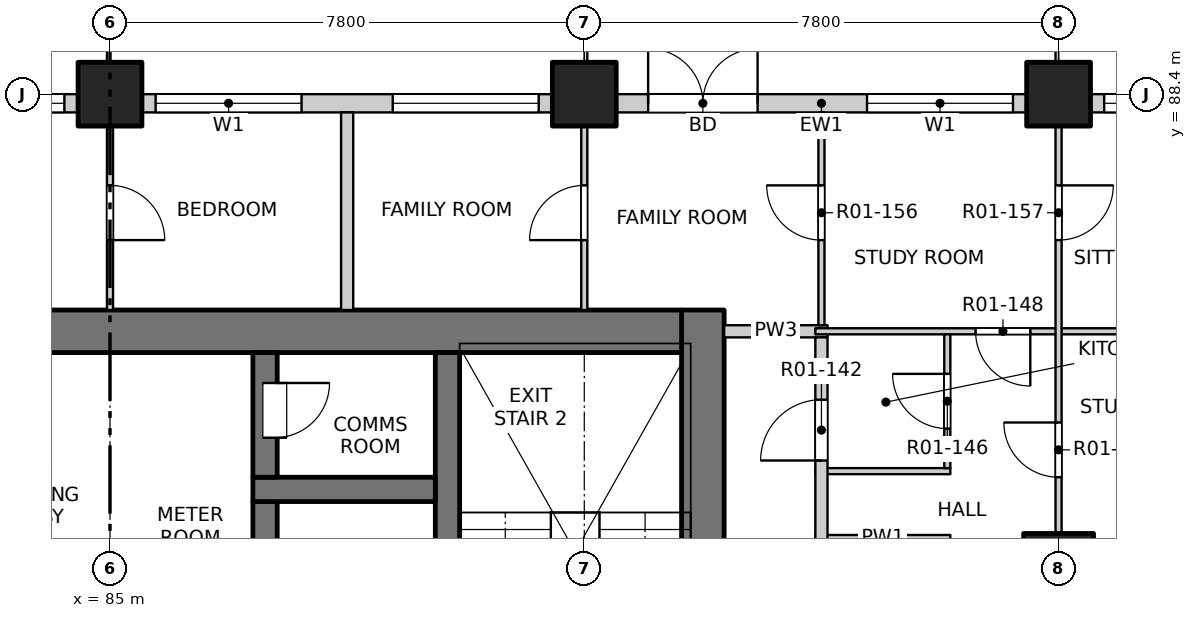
"""IFC4 building model, lengths in metres.
Left out: names, types, materials, properties, quantities, classifications, styles, units other than length and angle.
Written with IfcOpenShell. Run it as: python <this file> out.ifc"""

import sys

from ifc_helpers import new_model, si_unit, direction, frame, frame_2d, origin, origin_2d, place, context, subcontext, project, spatial, rectangle, extrude, element, fill, save


model = new_model("IFC4")
c1 = context("Model", 3, precision=1e-05, world=origin(), true_north=direction((0.0, 1.0)))
c2 = subcontext(c1, "Body", "Model", "MODEL_VIEW")
j1 = project(units=[si_unit("LENGTHUNIT", "METRE"), si_unit("PLANEANGLEUNIT", "RADIAN")], contexts=[c1])
p1 = place(None, origin())
s1 = spatial("IfcSite", under=j1, at=p1, CompositionType="ELEMENT")
p2 = place(p1, origin())
s2 = spatial("IfcBuilding", under=s1, at=p2, CompositionType="ELEMENT")
p3 = place(p2, frame((0.0, 0.0, 26.3)))
s3 = spatial("IfcBuildingStorey", under=s2, at=p3, CompositionType="ELEMENT", Elevation=26.3)
for number, where, z_axis, x_axis in (
    (1, (85.0, 88.4, -0.25), (0.0, 0.0, 1.0), (1.0, 0.0, 0.0)),
    (2, (92.8, 88.4, -0.25), (0.0, 0.0, 1.0), (1.0, 0.0, 0.0)),
    (3, (100.6, 88.4, -0.25), (0.0, 0.0, 1.0), (1.0, 0.0, 0.0)),
):
    element("IfcColumn", number, at=place(p3, frame(where, z_axis=z_axis, x_axis=x_axis)), inside=s3, PredefinedType="COLUMN", context=c2, shape_type="SweptSolid", body=[
        extrude(rectangle(XDim=1.05, YDim=1.05, at=origin_2d()), origin(), (0.0, 0.0, 1.0), 3.4),
    ])
p4 = place(p3, frame((100.6, 80.6, -0.25), z_axis=(0.0, 0.0, 1.0), x_axis=(1.0, 0.0, 0.0)))
e4 = element("IfcColumn", 4, at=p4, inside=s3, PredefinedType="COLUMN", context=c2, shape_type="SweptSolid", body=[
    extrude(rectangle(XDim=1.15, YDim=1.15, at=origin_2d()), origin(), (0.0, 0.0, 1.0), 3.4),
])
p5 = place(p3, frame((94.75, 77.3, -0.25), z_axis=(0.0, 0.0, 1.0), x_axis=(0.0, 1.0, 0.0)))
e5 = element("IfcWall", 5, at=p5, inside=s3, PredefinedType="SOLIDWALL", context=c2, shape_type="SweptSolid", body=[
    extrude(rectangle(XDim=7.55, YDim=0.7, at=frame_2d((3.775, 0.0))), origin(), (0.0, 0.0, 1.0), 3.4),
])
p6 = place(p5, frame((0.3, 0.0, 0.25)))
e6 = element("IfcOpeningElement", 6, at=p6, cuts=e5, PredefinedType="OPENING", context=c2, shape_type="SweptSolid", body=[
    extrude(rectangle(XDim=1.2, YDim=2.1, at=frame_2d((0.6, 1.05))), frame((0.0, 0.36, 0.0), z_axis=(0.0, -1.0, 0.0), x_axis=(1.0, 0.0, 0.0)), (0.0, 0.0, 1.0), 0.72),
])
p7 = place(p3, frame((75.6, 84.5, -0.25), z_axis=(0.0, 0.0, 1.0), x_axis=(1.0, 0.0, 0.0)))
e7 = element("IfcWall", 7, at=p7, inside=s3, PredefinedType="SOLIDWALL", context=c2, shape_type="SweptSolid", body=[
    extrude(rectangle(XDim=18.8, YDim=0.7, at=frame_2d((9.4, 0.0))), origin(), (0.0, 0.0, 1.0), 3.4),
])
p8 = place(p3, frame((90.55, 77.3, -0.25), z_axis=(0.0, 0.0, 1.0), x_axis=(0.0, 1.0, 0.0)))
e8 = element("IfcWall", 8, at=p8, inside=s3, PredefinedType="SOLIDWALL", context=c2, shape_type="SweptSolid", body=[
    extrude(rectangle(XDim=6.85, YDim=0.4, at=frame_2d((3.425, 0.0))), origin(), (0.0, 0.0, 1.0), 3.4),
])
p9 = place(p3, frame((87.55, 79.5, -0.25), z_axis=(0.0, 0.0, 1.0), x_axis=(0.0, 1.0, 0.0)))
e9 = element("IfcWall", 9, at=p9, inside=s3, PredefinedType="SOLIDWALL", context=c2, shape_type="SweptSolid", body=[
    extrude(rectangle(XDim=2.2, YDim=0.4, at=frame_2d((1.1, 0.0))), origin(), (0.0, 0.0, 1.0), 3.4),
])
p10 = place(p9, frame((0.65, 0.0, 0.25)))
e10 = element("IfcOpeningElement", 10, at=p10, cuts=e9, PredefinedType="OPENING", context=c2, shape_type="SweptSolid", body=[
    extrude(rectangle(XDim=0.9, YDim=2.1, at=frame_2d((0.45, 1.05))), frame((0.0, 0.21, 0.0), z_axis=(0.0, -1.0, 0.0), x_axis=(1.0, 0.0, 0.0)), (0.0, 0.0, 1.0), 0.42),
])
p11 = place(p3, frame((87.35, 81.9, -0.25), z_axis=(0.0, 0.0, 1.0), x_axis=(1.0, 0.0, 0.0)))
e11 = element("IfcWall", 11, at=p11, inside=s3, PredefinedType="SOLIDWALL", context=c2, shape_type="SweptSolid", body=[
    extrude(rectangle(XDim=3.0, YDim=0.4, at=frame_2d((1.5, 0.0))), origin(), (0.0, 0.0, 1.0), 3.4),
])
p12 = place(p3, frame((87.55, 82.1, -0.25), z_axis=(0.0, 0.0, 1.0), x_axis=(0.0, 1.0, 0.0)))
e12 = element("IfcWall", 12, at=p12, inside=s3, PredefinedType="SOLIDWALL", context=c2, shape_type="SweptSolid", body=[
    extrude(rectangle(XDim=2.05, YDim=0.4, at=frame_2d((1.025, 0.0))), origin(), (0.0, 0.0, 1.0), 3.4),
])
p13 = place(p12, frame((0.65, 0.0, 0.25)))
e13 = element("IfcOpeningElement", 13, at=p13, cuts=e12, PredefinedType="OPENING", context=c2, shape_type="SweptSolid", body=[
    extrude(rectangle(XDim=0.9, YDim=2.1, at=frame_2d((0.45, 1.05))), frame((0.0, 0.21, 0.0), z_axis=(0.0, -1.0, 0.0), x_axis=(1.0, 0.0, 0.0)), (0.0, 0.0, 1.0), 0.42),
])
p14 = place(p3, frame((77.725, 88.25, 0.0), z_axis=(0.0, 0.0, 1.0), x_axis=(1.0, 0.0, 0.0)))
e14 = element("IfcWall", 14, at=p14, inside=s3, PredefinedType="SOLIDWALL", context=c2, shape_type="SweptSolid", body=[
    extrude(rectangle(XDim=6.75, YDim=0.3, at=frame_2d((3.375, 0.0))), origin(), (0.0, 0.0, 1.0), 2.7),
])
p15 = place(p14, frame((0.525, 0.0, 0.0)))
e15 = element("IfcOpeningElement", 15, at=p15, cuts=e14, PredefinedType="OPENING", context=c2, shape_type="SweptSolid", body=[
    extrude(rectangle(XDim=1.8, YDim=2.4, at=frame_2d((0.9, 1.2))), frame((0.0, 0.16, 0.0), z_axis=(0.0, -1.0, 0.0), x_axis=(1.0, 0.0, 0.0)), (0.0, 0.0, 1.0), 0.32),
])
p16 = place(p14, frame((4.125, 0.0, 0.9)))
e16 = element("IfcOpeningElement", 16, at=p16, cuts=e14, PredefinedType="OPENING", context=c2, shape_type="SweptSolid", body=[
    extrude(rectangle(XDim=2.4, YDim=1.8, at=frame_2d((1.2, 0.9))), frame((0.0, 0.16, 0.0), z_axis=(0.0, -1.0, 0.0), x_axis=(1.0, 0.0, 0.0)), (0.0, 0.0, 1.0), 0.32),
])
p17 = place(p3, frame((85.525, 88.25, 0.0), z_axis=(0.0, 0.0, 1.0), x_axis=(1.0, 0.0, 0.0)))
e17 = element("IfcWall", 17, at=p17, inside=s3, PredefinedType="SOLIDWALL", context=c2, shape_type="SweptSolid", body=[
    extrude(rectangle(XDim=6.75, YDim=0.3, at=frame_2d((3.375, 0.0))), origin(), (0.0, 0.0, 1.0), 2.7),
])
p18 = place(p17, frame((0.225, 0.0, 0.9)))
e18 = element("IfcOpeningElement", 18, at=p18, cuts=e17, PredefinedType="OPENING", context=c2, shape_type="SweptSolid", body=[
    extrude(rectangle(XDim=2.4, YDim=1.8, at=frame_2d((1.2, 0.9))), frame((0.0, 0.16, 0.0), z_axis=(0.0, -1.0, 0.0), x_axis=(1.0, 0.0, 0.0)), (0.0, 0.0, 1.0), 0.32),
])
p19 = place(p17, frame((4.125, 0.0, 0.9)))
e19 = element("IfcOpeningElement", 19, at=p19, cuts=e17, PredefinedType="OPENING", context=c2, shape_type="SweptSolid", body=[
    extrude(rectangle(XDim=2.4, YDim=1.8, at=frame_2d((1.2, 0.9))), frame((0.0, 0.16, 0.0), z_axis=(0.0, -1.0, 0.0), x_axis=(1.0, 0.0, 0.0)), (0.0, 0.0, 1.0), 0.32),
])
p20 = place(p3, frame((93.325, 88.25, 0.0), z_axis=(0.0, 0.0, 1.0), x_axis=(1.0, 0.0, 0.0)))
e20 = element("IfcWall", 20, at=p20, inside=s3, PredefinedType="SOLIDWALL", context=c2, shape_type="SweptSolid", body=[
    extrude(rectangle(XDim=6.75, YDim=0.3, at=frame_2d((3.375, 0.0))), origin(), (0.0, 0.0, 1.0), 2.7),
])
p21 = place(p20, frame((0.525, 0.0, 0.0)))
e21 = element("IfcOpeningElement", 21, at=p21, cuts=e20, PredefinedType="OPENING", context=c2, shape_type="SweptSolid", body=[
    extrude(rectangle(XDim=1.8, YDim=2.4, at=frame_2d((0.9, 1.2))), frame((0.0, 0.16, 0.0), z_axis=(0.0, -1.0, 0.0), x_axis=(1.0, 0.0, 0.0)), (0.0, 0.0, 1.0), 0.32),
])
p22 = place(p20, frame((4.125, 0.0, 0.9)))
e22 = element("IfcOpeningElement", 22, at=p22, cuts=e20, PredefinedType="OPENING", context=c2, shape_type="SweptSolid", body=[
    extrude(rectangle(XDim=2.4, YDim=1.8, at=frame_2d((1.2, 0.9))), frame((0.0, 0.16, 0.0), z_axis=(0.0, -1.0, 0.0), x_axis=(1.0, 0.0, 0.0)), (0.0, 0.0, 1.0), 0.32),
])
p23 = place(p3, frame((101.125, 88.25, 0.0), z_axis=(0.0, 0.0, 1.0), x_axis=(1.0, 0.0, 0.0)))
e23 = element("IfcWall", 23, at=p23, inside=s3, PredefinedType="SOLIDWALL", context=c2, shape_type="SweptSolid", body=[
    extrude(rectangle(XDim=3.375, YDim=0.3, at=frame_2d((1.688, 0.0))), origin(), (0.0, 0.0, 1.0), 2.7),
])
p24 = place(p23, frame((0.225, 0.0, 0.9)))
e24 = element("IfcOpeningElement", 24, at=p24, cuts=e23, PredefinedType="OPENING", context=c2, shape_type="SweptSolid", body=[
    extrude(rectangle(XDim=2.4, YDim=1.8, at=frame_2d((1.2, 0.9))), frame((0.0, 0.16, 0.0), z_axis=(0.0, -1.0, 0.0), x_axis=(1.0, 0.0, 0.0)), (0.0, 0.0, 1.0), 0.32),
])
for number, where, z_axis, x_axis in (
    (25, (96.6, 81.1, 0.0), (0.0, 0.0, 1.0), (1.0, 0.0, 0.0)),
    (26, (96.6, 82.2, 0.0), (0.0, 0.0, 1.0), (1.0, 0.0, 0.0)),
):
    element("IfcWall", number, at=place(p3, frame(where, z_axis=z_axis, x_axis=x_axis)), inside=s3, PredefinedType="PARTITIONING", context=c2, shape_type="SweptSolid", body=[
        extrude(rectangle(XDim=2.22, YDim=0.1, at=frame_2d((1.11, 0.0))), origin(), (0.0, 0.0, 1.0), 3.15),
    ])
p25 = place(p3, frame((95.1, 84.5, 0.0), z_axis=(0.0, 0.0, 1.0), x_axis=(1.0, 0.0, 0.0)))
e27 = element("IfcWall", 27, at=p25, inside=s3, PredefinedType="PARTITIONING", context=c2, shape_type="SweptSolid", body=[
    extrude(rectangle(XDim=1.7, YDim=0.2, at=frame_2d((0.85, 0.0))), origin(), (0.0, 0.0, 1.0), 3.15),
])
p26 = place(p3, frame((96.6, 84.5, 0.0), z_axis=(0.0, 0.0, 1.0), x_axis=(1.0, 0.0, 0.0)))
e28 = element("IfcWall", 28, at=p26, inside=s3, PredefinedType="PARTITIONING", context=c2, shape_type="SweptSolid", body=[
    extrude(rectangle(XDim=11.5, YDim=0.1, at=frame_2d((5.75, 0.0))), origin(), (0.0, 0.0, 1.0), 3.15),
])
p27 = place(p26, frame((2.635, 0.0, 0.0)))
e29 = element("IfcOpeningElement", 29, at=p27, cuts=e28, PredefinedType="OPENING", context=c2, shape_type="SweptSolid", body=[
    extrude(rectangle(XDim=0.9, YDim=2.1, at=frame_2d((0.45, 1.05))), frame((0.0, 0.06, 0.0), z_axis=(0.0, -1.0, 0.0), x_axis=(1.0, 0.0, 0.0)), (0.0, 0.0, 1.0), 0.12),
])
p28 = place(p3, frame((85.0, 84.85, 0.0), z_axis=(0.0, 0.0, 1.0), x_axis=(0.0, 1.0, 0.0)))
e30 = element("IfcWall", 30, at=p28, inside=s3, PredefinedType="PARTITIONING", context=c2, shape_type="SweptSolid", body=[
    extrude(rectangle(XDim=3.25, YDim=0.1, at=frame_2d((1.625, 0.0))), origin(), (0.0, 0.0, 1.0), 3.15),
])
p29 = place(p28, frame((1.15, 0.0, 0.0)))
e31 = element("IfcOpeningElement", 31, at=p29, cuts=e30, PredefinedType="OPENING", context=c2, shape_type="SweptSolid", body=[
    extrude(rectangle(XDim=0.9, YDim=2.1, at=frame_2d((0.45, 1.05))), frame((0.0, 0.06, 0.0), z_axis=(0.0, -1.0, 0.0), x_axis=(1.0, 0.0, 0.0)), (0.0, 0.0, 1.0), 0.12),
])
p30 = place(p3, frame((88.9, 84.85, 0.0), z_axis=(0.0, 0.0, 1.0), x_axis=(0.0, 1.0, 0.0)))
e32 = element("IfcWall", 32, at=p30, inside=s3, PredefinedType="PARTITIONING", context=c2, shape_type="SweptSolid", body=[
    extrude(rectangle(XDim=3.25, YDim=0.2, at=frame_2d((1.625, 0.0))), origin(), (0.0, 0.0, 1.0), 3.15),
])
p31 = place(p3, frame((92.8, 84.85, 0.0), z_axis=(0.0, 0.0, 1.0), x_axis=(0.0, 1.0, 0.0)))
e33 = element("IfcWall", 33, at=p31, inside=s3, PredefinedType="PARTITIONING", context=c2, shape_type="SweptSolid", body=[
    extrude(rectangle(XDim=3.25, YDim=0.1, at=frame_2d((1.625, 0.0))), origin(), (0.0, 0.0, 1.0), 3.15),
])
p32 = place(p31, frame((1.15, 0.0, 0.0)))
e34 = element("IfcOpeningElement", 34, at=p32, cuts=e33, PredefinedType="OPENING", context=c2, shape_type="SweptSolid", body=[
    extrude(rectangle(XDim=0.9, YDim=2.1, at=frame_2d((0.45, 1.05))), frame((0.0, 0.06, 0.0), z_axis=(0.0, -1.0, 0.0), x_axis=(1.0, 0.0, 0.0)), (0.0, 0.0, 1.0), 0.12),
])
p33 = place(p3, frame((96.7, 53.4, 0.0), z_axis=(0.0, 0.0, 1.0), x_axis=(0.0, 1.0, 0.0)))
e35 = element("IfcWall", 35, at=p33, inside=s3, PredefinedType="PARTITIONING", context=c2, shape_type="SweptSolid", body=[
    extrude(rectangle(XDim=31.0, YDim=0.2, at=frame_2d((15.5, 0.0))), origin(), (0.0, 0.0, 1.0), 3.15),
])
p34 = place(p33, frame((5.575, 0.0, 0.0)))
e36 = element("IfcOpeningElement", 36, at=p34, cuts=e35, PredefinedType="OPENING", context=c2, shape_type="SweptSolid", body=[
    extrude(rectangle(XDim=1.0, YDim=2.1, at=frame_2d((0.5, 1.05))), frame((0.0, 0.11, 0.0), z_axis=(0.0, -1.0, 0.0), x_axis=(1.0, 0.0, 0.0)), (0.0, 0.0, 1.0), 0.22),
])
p35 = place(p33, frame((10.075, 0.0, 0.0)))
e37 = element("IfcOpeningElement", 37, at=p35, cuts=e35, PredefinedType="OPENING", context=c2, shape_type="SweptSolid", body=[
    extrude(rectangle(XDim=1.0, YDim=2.1, at=frame_2d((0.5, 1.05))), frame((0.0, 0.11, 0.0), z_axis=(0.0, -1.0, 0.0), x_axis=(1.0, 0.0, 0.0)), (0.0, 0.0, 1.0), 0.22),
])
p36 = place(p33, frame((28.975, 0.0, 0.0)))
e38 = element("IfcOpeningElement", 38, at=p36, cuts=e35, PredefinedType="OPENING", context=c2, shape_type="SweptSolid", body=[
    extrude(rectangle(XDim=1.0, YDim=2.1, at=frame_2d((0.5, 1.05))), frame((0.0, 0.11, 0.0), z_axis=(0.0, -1.0, 0.0), x_axis=(1.0, 0.0, 0.0)), (0.0, 0.0, 1.0), 0.22),
])
p37 = place(p3, frame((96.7, 84.6, 0.0), z_axis=(0.0, 0.0, 1.0), x_axis=(0.0, 1.0, 0.0)))
e39 = element("IfcWall", 39, at=p37, inside=s3, PredefinedType="PARTITIONING", context=c2, shape_type="SweptSolid", body=[
    extrude(rectangle(XDim=3.5, YDim=0.1, at=frame_2d((1.75, 0.0))), origin(), (0.0, 0.0, 1.0), 3.15),
])
p38 = place(p37, frame((1.4, 0.0, 0.0)))
e40 = element("IfcOpeningElement", 40, at=p38, cuts=e39, PredefinedType="OPENING", context=c2, shape_type="SweptSolid", body=[
    extrude(rectangle(XDim=0.9, YDim=2.1, at=frame_2d((0.45, 1.05))), frame((0.0, 0.06, 0.0), z_axis=(0.0, -1.0, 0.0), x_axis=(1.0, 0.0, 0.0)), (0.0, 0.0, 1.0), 0.12),
])
p39 = place(p3, frame((98.77, 82.25, 0.0), z_axis=(0.0, 0.0, 1.0), x_axis=(0.0, 1.0, 0.0)))
e41 = element("IfcWall", 41, at=p39, inside=s3, PredefinedType="PARTITIONING", context=c2, shape_type="SweptSolid", body=[
    extrude(rectangle(XDim=2.2, YDim=0.1, at=frame_2d((1.1, 0.0))), origin(), (0.0, 0.0, 1.0), 3.15),
])
p40 = place(p39, frame((0.65, 0.0, 0.0)))
e42 = element("IfcOpeningElement", 42, at=p40, cuts=e41, PredefinedType="OPENING", context=c2, shape_type="SweptSolid", body=[
    extrude(rectangle(XDim=0.9, YDim=2.1, at=frame_2d((0.45, 1.05))), frame((0.0, 0.06, 0.0), z_axis=(0.0, -1.0, 0.0), x_axis=(1.0, 0.0, 0.0)), (0.0, 0.0, 1.0), 0.12),
])
p41 = place(p3, frame((100.6, 80.6, 0.0), z_axis=(0.0, 0.0, 1.0), x_axis=(0.0, 1.0, 0.0)))
e43 = element("IfcWall", 43, at=p41, inside=s3, PredefinedType="PARTITIONING", context=c2, shape_type="SweptSolid", body=[
    extrude(rectangle(XDim=7.5, YDim=0.1, at=frame_2d((3.75, 0.0))), origin(), (0.0, 0.0, 1.0), 2.55),
])
p42 = place(p41, frame((1.5, 0.0, 0.0)))
e44 = element("IfcOpeningElement", 44, at=p42, cuts=e43, PredefinedType="OPENING", context=c2, shape_type="SweptSolid", body=[
    extrude(rectangle(XDim=0.9, YDim=2.1, at=frame_2d((0.45, 1.05))), frame((0.0, 0.06, 0.0), z_axis=(0.0, -1.0, 0.0), x_axis=(1.0, 0.0, 0.0)), (0.0, 0.0, 1.0), 0.12),
])
p43 = place(p41, frame((5.4, 0.0, 0.0)))
e45 = element("IfcOpeningElement", 45, at=p43, cuts=e43, PredefinedType="OPENING", context=c2, shape_type="SweptSolid", body=[
    extrude(rectangle(XDim=0.9, YDim=2.1, at=frame_2d((0.45, 1.05))), frame((0.0, 0.06, 0.0), z_axis=(0.0, -1.0, 0.0), x_axis=(1.0, 0.0, 0.0)), (0.0, 0.0, 1.0), 0.12),
])
p44 = place(p16, origin())
e46 = element("IfcWindow", 46, at=p44, inside=s3, PartitioningType="DOUBLE_PANEL_VERTICAL", PredefinedType="WINDOW", context=c2, shape_type="SweptSolid", body=[
    extrude(rectangle(XDim=2.4, YDim=1.8, at=frame_2d((1.2, 0.9))), frame((0.0, 0.03, 0.0), z_axis=(0.0, -1.0, 0.0), x_axis=(1.0, 0.0, 0.0)), (0.0, 0.0, 1.0), 0.06),
])
fill(e16, e46)
p45 = place(p18, origin())
e47 = element("IfcWindow", 47, at=p45, inside=s3, PartitioningType="DOUBLE_PANEL_VERTICAL", PredefinedType="WINDOW", context=c2, shape_type="SweptSolid", body=[
    extrude(rectangle(XDim=2.4, YDim=1.8, at=frame_2d((1.2, 0.9))), frame((0.0, 0.03, 0.0), z_axis=(0.0, -1.0, 0.0), x_axis=(1.0, 0.0, 0.0)), (0.0, 0.0, 1.0), 0.06),
])
fill(e18, e47)
p46 = place(p19, origin())
e48 = element("IfcWindow", 48, at=p46, inside=s3, PartitioningType="DOUBLE_PANEL_VERTICAL", PredefinedType="WINDOW", context=c2, shape_type="SweptSolid", body=[
    extrude(rectangle(XDim=2.4, YDim=1.8, at=frame_2d((1.2, 0.9))), frame((0.0, 0.03, 0.0), z_axis=(0.0, -1.0, 0.0), x_axis=(1.0, 0.0, 0.0)), (0.0, 0.0, 1.0), 0.06),
])
fill(e19, e48)
p47 = place(p21, origin())
e49 = element("IfcDoor", 49, at=p47, inside=s3, OperationType="DOUBLE_DOOR_SINGLE_SWING", PredefinedType="DOOR", context=c2, shape_type="SweptSolid", body=[
    extrude(rectangle(XDim=1.8, YDim=2.4, at=frame_2d((0.9, 1.2))), frame((0.0, 0.025, 0.0), z_axis=(0.0, -1.0, 0.0), x_axis=(1.0, 0.0, 0.0)), (0.0, 0.0, 1.0), 0.05),
])
fill(e21, e49)
p48 = place(p22, origin())
e50 = element("IfcWindow", 50, at=p48, inside=s3, PartitioningType="DOUBLE_PANEL_VERTICAL", PredefinedType="WINDOW", context=c2, shape_type="SweptSolid", body=[
    extrude(rectangle(XDim=2.4, YDim=1.8, at=frame_2d((1.2, 0.9))), frame((0.0, 0.03, 0.0), z_axis=(0.0, -1.0, 0.0), x_axis=(1.0, 0.0, 0.0)), (0.0, 0.0, 1.0), 0.06),
])
fill(e22, e50)
p49 = place(p24, origin())
e51 = element("IfcWindow", 51, at=p49, inside=s3, PartitioningType="DOUBLE_PANEL_VERTICAL", PredefinedType="WINDOW", context=c2, shape_type="SweptSolid", body=[
    extrude(rectangle(XDim=2.4, YDim=1.8, at=frame_2d((1.2, 0.9))), frame((0.0, 0.03, 0.0), z_axis=(0.0, -1.0, 0.0), x_axis=(1.0, 0.0, 0.0)), (0.0, 0.0, 1.0), 0.06),
])
fill(e24, e51)
p50 = place(p42, origin())
e52 = element("IfcDoor", 52, at=p50, inside=s3, OperationType="SINGLE_SWING_RIGHT", PredefinedType="DOOR", context=c2, shape_type="SweptSolid", body=[
    extrude(rectangle(XDim=0.9, YDim=2.1, at=frame_2d((0.45, 1.05))), frame((0.0, 0.025, 0.0), z_axis=(0.0, -1.0, 0.0), x_axis=(1.0, 0.0, 0.0)), (0.0, 0.0, 1.0), 0.05),
])
fill(e44, e52)
p51 = place(p36, origin())
e53 = element("IfcDoor", 53, at=p51, inside=s3, OperationType="SINGLE_SWING_LEFT", PredefinedType="DOOR", context=c2, shape_type="SweptSolid", body=[
    extrude(rectangle(XDim=1.0, YDim=2.1, at=frame_2d((0.5, 1.05))), frame((0.0, 0.025, 0.0), z_axis=(0.0, -1.0, 0.0), x_axis=(1.0, 0.0, 0.0)), (0.0, 0.0, 1.0), 0.05),
])
fill(e38, e53)
p52 = place(p13, origin())
e54 = element("IfcDoor", 54, at=p52, inside=s3, OperationType="SINGLE_SWING_LEFT", PredefinedType="DOOR", context=c2, shape_type="SweptSolid", body=[
    extrude(rectangle(XDim=0.9, YDim=2.1, at=frame_2d((0.45, 1.05))), frame((0.0, -0.135, 0.0), z_axis=(0.0, -1.0, 0.0), x_axis=(1.0, 0.0, 0.0)), (0.0, 0.0, 1.0), 0.05),
])
fill(e13, e54)
p53 = place(p40, origin())
e55 = element("IfcDoor", 55, at=p53, inside=s3, OperationType="SINGLE_SWING_RIGHT", PredefinedType="DOOR", context=c2, shape_type="SweptSolid", body=[
    extrude(rectangle(XDim=0.9, YDim=2.1, at=frame_2d((0.45, 1.05))), frame((0.0, 0.025, 0.0), z_axis=(0.0, -1.0, 0.0), x_axis=(1.0, 0.0, 0.0)), (0.0, 0.0, 1.0), 0.05),
])
fill(e42, e55)
p54 = place(p27, origin())
e56 = element("IfcDoor", 56, at=p54, inside=s3, OperationType="SINGLE_SWING_LEFT", PredefinedType="DOOR", context=c2, shape_type="SweptSolid", body=[
    extrude(rectangle(XDim=0.9, YDim=2.1, at=frame_2d((0.45, 1.05))), frame((0.0, 0.025, 0.0), z_axis=(0.0, -1.0, 0.0), x_axis=(1.0, 0.0, 0.0)), (0.0, 0.0, 1.0), 0.05),
])
fill(e29, e56)
p55 = place(p29, origin())
e57 = element("IfcDoor", 57, at=p55, inside=s3, OperationType="SINGLE_SWING_RIGHT", PredefinedType="DOOR", context=c2, shape_type="SweptSolid", body=[
    extrude(rectangle(XDim=0.9, YDim=2.1, at=frame_2d((0.45, 1.05))), frame((0.0, 0.025, 0.0), z_axis=(0.0, -1.0, 0.0), x_axis=(1.0, 0.0, 0.0)), (0.0, 0.0, 1.0), 0.05),
])
fill(e31, e57)
p56 = place(p32, origin())
e58 = element("IfcDoor", 58, at=p56, inside=s3, OperationType="SINGLE_SWING_LEFT", PredefinedType="DOOR", context=c2, shape_type="SweptSolid", body=[
    extrude(rectangle(XDim=0.9, YDim=2.1, at=frame_2d((0.45, 1.05))), frame((0.0, 0.025, 0.0), z_axis=(0.0, -1.0, 0.0), x_axis=(1.0, 0.0, 0.0)), (0.0, 0.0, 1.0), 0.05),
])
fill(e34, e58)
p57 = place(p38, origin())
e59 = element("IfcDoor", 59, at=p57, inside=s3, OperationType="SINGLE_SWING_RIGHT", PredefinedType="DOOR", context=c2, shape_type="SweptSolid", body=[
    extrude(rectangle(XDim=0.9, YDim=2.1, at=frame_2d((0.45, 1.05))), frame((0.0, 0.025, 0.0), z_axis=(0.0, -1.0, 0.0), x_axis=(1.0, 0.0, 0.0)), (0.0, 0.0, 1.0), 0.05),
])
fill(e40, e59)
p58 = place(p43, origin())
e60 = element("IfcDoor", 60, at=p58, inside=s3, OperationType="SINGLE_SWING_LEFT", PredefinedType="DOOR", context=c2, shape_type="SweptSolid", body=[
    extrude(rectangle(XDim=0.9, YDim=2.1, at=frame_2d((0.45, 1.05))), frame((0.0, 0.025, 0.0), z_axis=(0.0, -1.0, 0.0), x_axis=(1.0, 0.0, 0.0)), (0.0, 0.0, 1.0), 0.05),
])
fill(e45, e60)
save(model, sys.argv[1])
